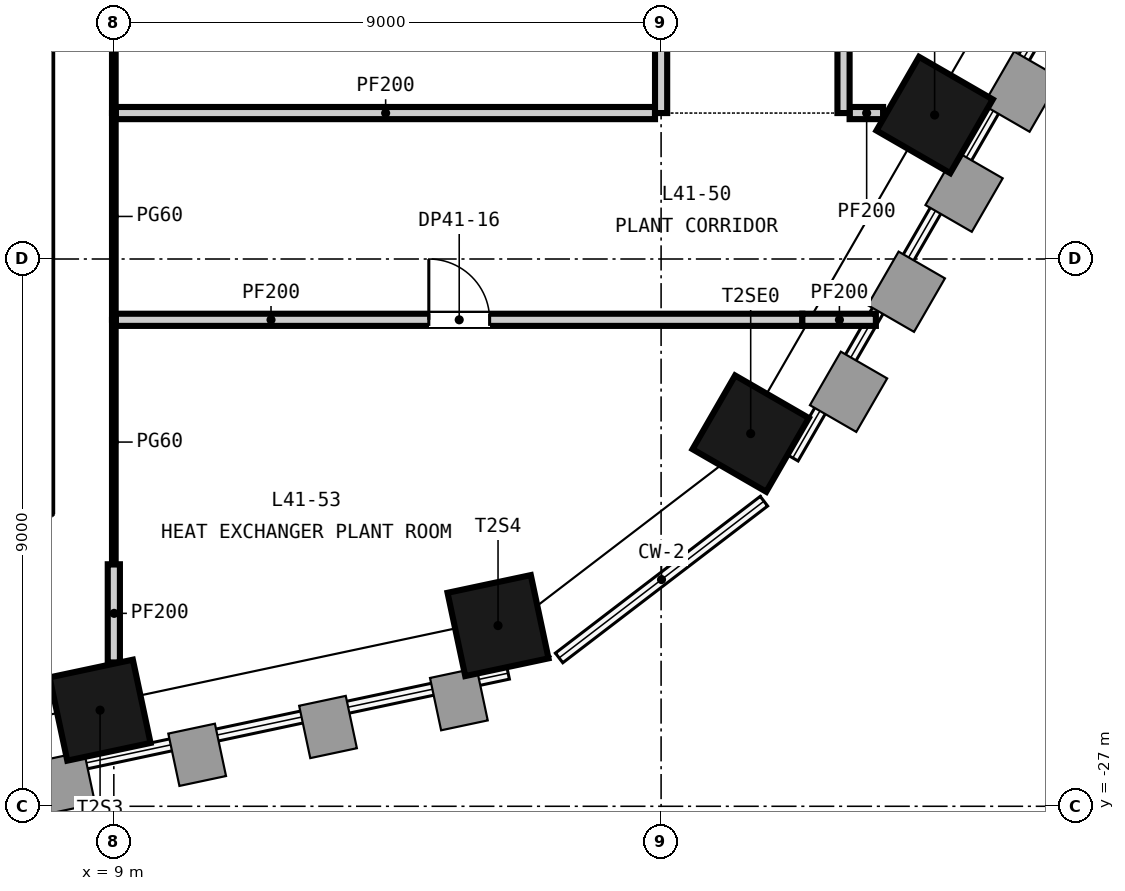
"""IFC4 building model, lengths in metres.
Left out: names, types, materials, properties, quantities, classifications, styles, units other than length and angle.
Written with IfcOpenShell. Run it as: python <this file> out.ifc"""

import sys

from ifc_helpers import new_model, si_unit, direction, frame, frame_2d, origin, origin_2d, place, context, subcontext, project, spatial, rectangle, extrude, element, fill, save


model = new_model("IFC4")
c1 = context("Model", 3, precision=1e-05, world=origin(), true_north=direction((0.0, 1.0)))
c2 = subcontext(c1, "Body", "Model", "MODEL_VIEW")
j1 = project(units=[si_unit("LENGTHUNIT", "METRE"), si_unit("PLANEANGLEUNIT", "RADIAN")], contexts=[c1])
p1 = place(None, origin())
s1 = spatial("IfcSite", under=j1, at=p1, CompositionType="ELEMENT")
p2 = place(p1, origin())
s2 = spatial("IfcBuilding", under=s1, at=p2, CompositionType="ELEMENT")
p3 = place(p2, frame((0.0, 0.0, 166.3)))
s3 = spatial("IfcBuildingStorey", under=s2, at=p3, CompositionType="ELEMENT", Elevation=166.3)
for number, where, z_axis, x_axis in (
    (1, (8.774, -25.419, -0.3), (0.0, 0.0, 1.0), (0.978, 0.208, 0.0)),
    (2, (15.318, -24.028, -0.3), (0.0, 0.0, 1.0), (0.978, 0.208, 0.0)),
    (3, (19.473, -20.871, -0.3), (0.0, 0.0, 1.0), (0.5, 0.866, 0.0)),
    (4, (22.498, -15.632, -0.3), (0.0, 0.0, 1.0), (0.5, 0.866, 0.0)),
):
    element("IfcColumn", number, at=place(p3, frame(where, z_axis=z_axis, x_axis=x_axis)), inside=s3, PredefinedType="COLUMN", context=c2, shape_type="SweptSolid", body=[
        extrude(rectangle(XDim=1.4, YDim=1.4, at=origin_2d()), origin(), (0.0, 0.0, 1.0), 4.65),
    ])
p4 = place(p3, frame((9.03, -19.0, 0.0), z_axis=(0.0, 0.0, 1.0), x_axis=(1.0, 0.0, 0.0)))
e5 = element("IfcWall", 5, at=p4, inside=s3, PredefinedType="PARTITIONING", context=c2, shape_type="SweptSolid", body=[
    extrude(rectangle(XDim=11.293, YDim=0.2, at=frame_2d((5.646, 0.0))), origin(), (0.0, 0.0, 1.0), 4.35),
])
p5 = place(p4, frame((5.15, 0.0, 0.0)))
e6 = element("IfcOpeningElement", 6, at=p5, cuts=e5, PredefinedType="OPENING", context=c2, shape_type="SweptSolid", body=[
    extrude(rectangle(XDim=1.0, YDim=2.1, at=frame_2d((0.5, 1.05))), frame((0.0, 0.11, 0.0), z_axis=(0.0, -1.0, 0.0), x_axis=(1.0, 0.0, 0.0)), (0.0, 0.0, 1.0), 0.22),
])
p6 = place(p3, frame((20.323, -19.0, 0.0), z_axis=(0.0, 0.0, 1.0), x_axis=(1.0, 0.0, 0.0)))
e7 = element("IfcWall", 7, at=p6, inside=s3, PredefinedType="PARTITIONING", context=c2, shape_type="SweptSolid", body=[
    extrude(rectangle(XDim=1.209, YDim=0.2, at=frame_2d((0.604, 0.0))), origin(), (0.0, 0.0, 1.0), 3.6),
])
p7 = place(p3, frame((9.03, -15.6, 0.0), z_axis=(0.0, 0.0, 1.0), x_axis=(1.0, 0.0, 0.0)))
e8 = element("IfcWall", 8, at=p7, inside=s3, PredefinedType="PARTITIONING", context=c2, shape_type="SweptSolid", body=[
    extrude(rectangle(XDim=8.87, YDim=0.2, at=frame_2d((4.435, 0.0))), origin(), (0.0, 0.0, 1.0), 4.35),
])
p8 = place(p3, frame((21.1, -15.6, 0.0), z_axis=(0.0, 0.0, 1.0), x_axis=(1.0, 0.0, 0.0)))
e9 = element("IfcWall", 9, at=p8, inside=s3, PredefinedType="PARTITIONING", context=c2, shape_type="SweptSolid", body=[
    extrude(rectangle(XDim=0.551, YDim=0.2, at=frame_2d((0.275, 0.0))), origin(), (0.0, 0.0, 1.0), 4.35),
])
p9 = place(p3, frame((9.0, -24.635, 0.0), z_axis=(0.0, 0.0, 1.0), x_axis=(0.0, 1.0, 0.0)))
e10 = element("IfcWall", 10, at=p9, inside=s3, PredefinedType="PARTITIONING", context=c2, shape_type="SweptSolid", body=[
    extrude(rectangle(XDim=1.615, YDim=0.2, at=frame_2d((0.807, 0.0))), origin(), (0.0, 0.0, 1.0), 4.35),
])
p10 = place(p3, frame((9.0, -23.02, 0.0), z_axis=(0.0, 0.0, 1.0), x_axis=(0.0, 1.0, 0.0)))
e11 = element("IfcWall", 11, at=p10, inside=s3, PredefinedType="PARTITIONING", context=c2, shape_type="SweptSolid", body=[
    extrude(rectangle(XDim=4.019, YDim=0.06, at=frame_2d((2.01, 0.0))), origin(), (0.0, 0.0, 1.0), 4.35),
])
p11 = place(p3, frame((9.0, -18.999, 0.0), z_axis=(0.0, 0.0, 1.0), x_axis=(0.0, 1.0, 0.0)))
e12 = element("IfcWall", 12, at=p11, inside=s3, PredefinedType="PARTITIONING", context=c2, shape_type="SweptSolid", body=[
    extrude(rectangle(XDim=3.398, YDim=0.06, at=frame_2d((1.699, 0.0))), origin(), (0.0, 0.0, 1.0), 4.35),
])
p12 = place(p3, frame((9.0, -15.599, 0.0), z_axis=(0.0, 0.0, 1.0), x_axis=(0.0, 1.0, 0.0)))
e13 = element("IfcWall", 13, at=p12, inside=s3, PredefinedType="PARTITIONING", context=c2, shape_type="SweptSolid", body=[
    extrude(rectangle(XDim=6.598, YDim=0.06, at=frame_2d((3.299, 0.0))), origin(), (0.0, 0.0, 1.0), 4.35),
])
p13 = place(p3, frame((18.0, -15.6, 0.0), z_axis=(0.0, 0.0, 1.0), x_axis=(0.0, 1.0, 0.0)))
e14 = element("IfcWall", 14, at=p13, inside=s3, PredefinedType="PARTITIONING", context=c2, shape_type="SweptSolid", body=[
    extrude(rectangle(XDim=12.4, YDim=0.2, at=frame_2d((6.2, 0.0))), origin(), (0.0, 0.0, 1.0), 4.35),
])
p14 = place(p13, frame((5.65, 0.0, 0.0)))
e15 = element("IfcOpeningElement", 15, at=p14, cuts=e14, PredefinedType="OPENING", context=c2, shape_type="SweptSolid", body=[
    extrude(rectangle(XDim=1.0, YDim=2.1, at=frame_2d((0.5, 1.05))), frame((0.0, 0.11, 0.0), z_axis=(0.0, -1.0, 0.0), x_axis=(1.0, 0.0, 0.0)), (0.0, 0.0, 1.0), 0.22),
])
p15 = place(p3, frame((21.0, -15.6, 0.0), z_axis=(0.0, 0.0, 1.0), x_axis=(0.0, 1.0, 0.0)))
e16 = element("IfcWall", 16, at=p15, inside=s3, PredefinedType="PARTITIONING", context=c2, shape_type="SweptSolid", body=[
    extrude(rectangle(XDim=12.4, YDim=0.2, at=frame_2d((6.2, 0.0))), origin(), (0.0, 0.0, 1.0), 4.35),
])
p16 = place(p15, frame((5.65, 0.0, 0.0)))
e17 = element("IfcOpeningElement", 17, at=p16, cuts=e16, PredefinedType="OPENING", context=c2, shape_type="SweptSolid", body=[
    extrude(rectangle(XDim=1.0, YDim=2.1, at=frame_2d((0.5, 1.05))), frame((0.0, 0.11, 0.0), z_axis=(0.0, -1.0, 0.0), x_axis=(1.0, 0.0, 0.0)), (0.0, 0.0, 1.0), 0.22),
])
p17 = place(p5, origin())
e18 = element("IfcDoor", 18, at=p17, inside=s3, OperationType="SINGLE_SWING_LEFT", PredefinedType="DOOR", context=c2, shape_type="SweptSolid", body=[
    extrude(rectangle(XDim=1.0, YDim=2.1, at=frame_2d((0.5, 1.05))), frame((0.0, 0.025, 0.0), z_axis=(0.0, -1.0, 0.0), x_axis=(1.0, 0.0, 0.0)), (0.0, 0.0, 1.0), 0.05),
])
fill(e6, e18)
save(model, sys.argv[1])
